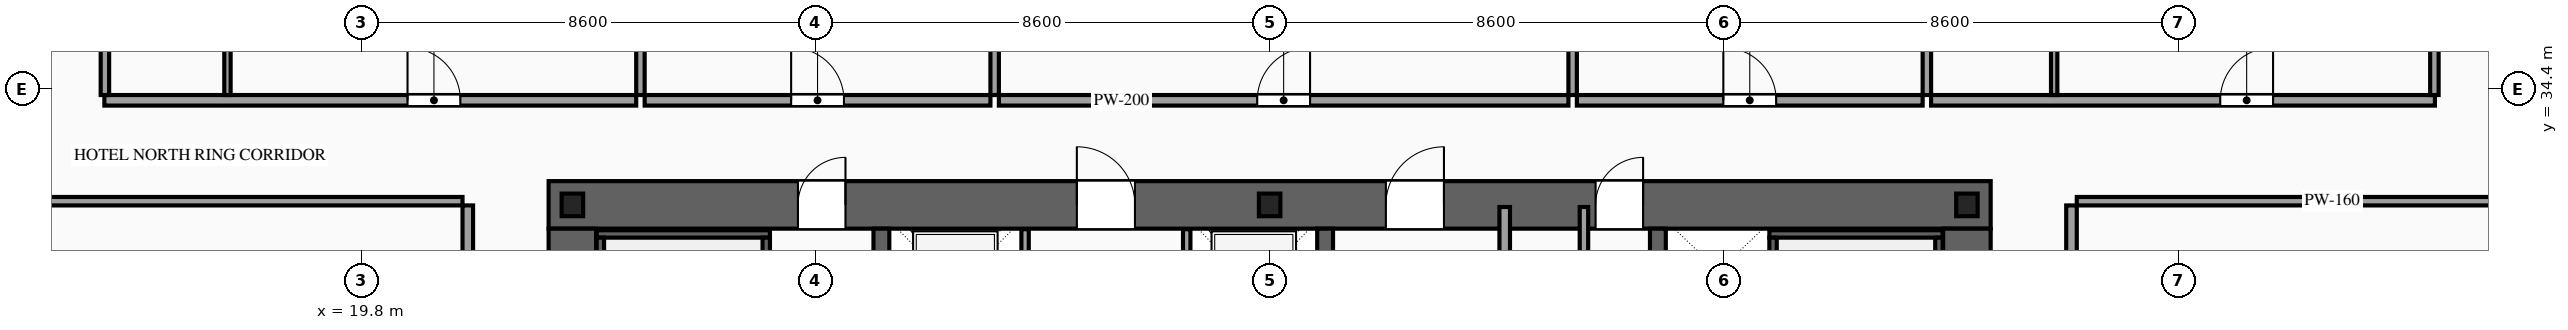
"""IFC4 building model, lengths in metres.
Left out: names, types, materials, properties, quantities, classifications, styles, units other than length and angle.
Written with IfcOpenShell. Run it as: python <this file> out.ifc"""

import sys

from ifc_helpers import new_model, si_unit, direction, frame, frame_2d, origin, origin_2d, place, context, subcontext, project, spatial, rectangle, i_section, extrude, source, transform, mapped, element, fill, save


model = new_model("IFC4")
c1 = context("Model", 3, precision=1e-05, world=origin(), true_north=direction((0.0, 1.0)))
c2 = subcontext(c1, "Body", "Model", "MODEL_VIEW")
j1 = project(units=[si_unit("LENGTHUNIT", "METRE"), si_unit("PLANEANGLEUNIT", "RADIAN")], contexts=[c1])
p1 = place(None, origin())
s1 = spatial("IfcSite", under=j1, at=p1, CompositionType="ELEMENT")
p2 = place(p1, origin())
s2 = spatial("IfcBuilding", under=s1, at=p2, CompositionType="ELEMENT")
p3 = place(p2, frame((0.0, 0.0, 64.0)))
s3 = spatial("IfcBuildingStorey", under=s2, at=p3, CompositionType="ELEMENT", Elevation=64.0)
p4 = place(p3, frame((23.35, 32.2, 0.0), z_axis=(0.0, 0.0, 1.0), x_axis=(1.0, 0.0, 0.0)))
e1 = element("IfcWall", 1, at=p4, inside=s3, PredefinedType="SHEAR", context=c2, shape_type="SweptSolid", body=[
    extrude(rectangle(XDim=27.3, YDim=0.9, at=frame_2d((13.65, 0.0))), origin(), (0.0, 0.0, 1.0), 3.6),
])
p5 = place(p4, frame((4.72, 0.0, 0.0)))
e2 = element("IfcOpeningElement", 2, at=p5, cuts=e1, PredefinedType="OPENING", context=c2, shape_type="SweptSolid", body=[
    extrude(rectangle(XDim=0.9, YDim=2.15, at=frame_2d((0.45, 1.075))), frame((0.0, 0.465, 0.0), z_axis=(0.0, -1.0, 0.0), x_axis=(1.0, 0.0, 0.0)), (0.0, 0.0, 1.0), 0.93),
])
p6 = place(p4, frame((10.0, 0.0, 0.0)))
e3 = element("IfcOpeningElement", 3, at=p6, cuts=e1, PredefinedType="OPENING", context=c2, shape_type="SweptSolid", body=[
    extrude(rectangle(XDim=1.1, YDim=2.2, at=frame_2d((0.55, 1.1))), frame((0.0, 0.465, 0.0), z_axis=(0.0, -1.0, 0.0), x_axis=(1.0, 0.0, 0.0)), (0.0, 0.0, 1.0), 0.93),
])
p7 = place(p4, frame((15.85, 0.0, 0.0)))
e4 = element("IfcOpeningElement", 4, at=p7, cuts=e1, PredefinedType="OPENING", context=c2, shape_type="SweptSolid", body=[
    extrude(rectangle(XDim=1.1, YDim=2.2, at=frame_2d((0.55, 1.1))), frame((0.0, 0.465, 0.0), z_axis=(0.0, -1.0, 0.0), x_axis=(1.0, 0.0, 0.0)), (0.0, 0.0, 1.0), 0.93),
])
p8 = place(p4, frame((19.82, 0.0, 0.0)))
e5 = element("IfcOpeningElement", 5, at=p8, cuts=e1, PredefinedType="OPENING", context=c2, shape_type="SweptSolid", body=[
    extrude(rectangle(XDim=0.9, YDim=2.15, at=frame_2d((0.45, 1.075))), frame((0.0, 0.465, 0.0), z_axis=(0.0, -1.0, 0.0), x_axis=(1.0, 0.0, 0.0)), (0.0, 0.0, 1.0), 0.93),
])
m1 = source(origin(), c2, "Body", "SweptSolid", [
    extrude(rectangle(XDim=11.9, YDim=0.9, at=frame_2d((5.95, 0.0))), origin(), (0.0, 0.0, 1.0), 3.6),
])
for number, where, z_axis, x_axis in (
    (6, (23.8, 19.85, 0.0), (0.0, 0.0, 1.0), (0.0, 1.0, 0.0)),
    (7, (50.2, 19.85, 0.0), (0.0, 0.0, 1.0), (0.0, 1.0, 0.0)),
):
    element("IfcWall", number, at=place(p3, frame(where, z_axis=z_axis, x_axis=x_axis)), inside=s3, PredefinedType="SHEAR", context=c2, shape_type="MappedRepresentation", body=[
        mapped(m1, transform((0.0, 0.0, 0.0), scale=1.0)),
    ])
m2 = source(origin(), c2, "Body", "SweptSolid", [
    extrude(rectangle(XDim=11.9, YDim=0.3, at=frame_2d((5.95, 0.0))), origin(), (0.0, 0.0, 1.0), 3.6),
])
for number, where, z_axis, x_axis in (
    (8, (29.65, 19.85, 0.0), (0.0, 0.0, 1.0), (0.0, 1.0, 0.0)),
    (9, (38.05, 19.85, 0.0), (0.0, 0.0, 1.0), (0.0, 1.0, 0.0)),
    (10, (44.35, 19.85, 0.0), (0.0, 0.0, 1.0), (0.0, 1.0, 0.0)),
):
    element("IfcWall", number, at=place(p3, frame(where, z_axis=z_axis, x_axis=x_axis)), inside=s3, PredefinedType="SOLIDWALL", context=c2, shape_type="MappedRepresentation", body=[
        mapped(m2, transform((0.0, 0.0, 0.0), scale=1.0)),
    ])
m3 = source(origin(), c2, "Body", "SweptSolid", [
    extrude(i_section(OverallWidth=0.407, OverallDepth=0.428, WebThickness=0.02, FlangeThickness=0.035, at=origin_2d()), origin(), (0.0, 0.0, 1.0), 3.6),
])
for number, where, z_axis, x_axis in (
    (11, (23.8, 32.2, 0.0), (0.0, 0.0, 1.0), (1.0, 0.0, 0.0)),
    (12, (37.0, 32.2, 0.0), (0.0, 0.0, 1.0), (1.0, 0.0, 0.0)),
    (13, (50.2, 32.2, 0.0), (0.0, 0.0, 1.0), (1.0, 0.0, 0.0)),
):
    element("IfcColumn", number, at=place(p3, frame(where, z_axis=z_axis, x_axis=x_axis)), inside=s3, PredefinedType="COLUMN", context=c2, shape_type="MappedRepresentation", body=[
        mapped(m3, transform((0.0, 0.0, 0.0), scale=1.0)),
    ])
p9 = place(p3, frame((32.37, 29.4, 0.0), z_axis=(0.0, 0.0, 1.0), x_axis=(0.0, 1.0, 0.0)))
e14 = element("IfcWall", 14, at=p9, inside=s3, PredefinedType="SOLIDWALL", context=c2, shape_type="SweptSolid", body=[
    extrude(rectangle(XDim=2.34, YDim=0.14, at=frame_2d((1.17, 0.0))), origin(), (0.0, 0.0, 1.0), 3.38),
])
p10 = place(p9, frame((0.62, 0.0, 0.0)))
e15 = element("IfcOpeningElement", 15, at=p10, cuts=e14, PredefinedType="OPENING", context=c2, shape_type="SweptSolid", body=[
    extrude(rectangle(XDim=1.1, YDim=2.2, at=frame_2d((0.55, 1.1))), frame((0.0, 0.085, 0.0), z_axis=(0.0, -1.0, 0.0), x_axis=(1.0, 0.0, 0.0)), (0.0, 0.0, 1.0), 0.17),
])
p11 = place(p3, frame((35.43, 29.4, 0.0), z_axis=(0.0, 0.0, 1.0), x_axis=(0.0, 1.0, 0.0)))
e16 = element("IfcWall", 16, at=p11, inside=s3, PredefinedType="SOLIDWALL", context=c2, shape_type="SweptSolid", body=[
    extrude(rectangle(XDim=2.34, YDim=0.14, at=frame_2d((1.17, 0.0))), origin(), (0.0, 0.0, 1.0), 3.38),
])
p12 = place(p11, frame((0.62, 0.0, 0.0)))
e17 = element("IfcOpeningElement", 17, at=p12, cuts=e16, PredefinedType="OPENING", context=c2, shape_type="SweptSolid", body=[
    extrude(rectangle(XDim=1.1, YDim=2.2, at=frame_2d((0.55, 1.1))), frame((0.0, 0.085, 0.0), z_axis=(0.0, -1.0, 0.0), x_axis=(1.0, 0.0, 0.0)), (0.0, 0.0, 1.0), 0.17),
])
m4 = source(origin(), c2, "Body", "SweptSolid", [
    extrude(rectangle(XDim=3.28, YDim=0.14, at=frame_2d((1.64, 0.0))), origin(), (0.0, 0.0, 1.0), 3.38),
])
p13 = place(p3, frame((24.26, 31.65, 0.0), z_axis=(0.0, 0.0, 1.0), x_axis=(1.0, 0.0, 0.0)))
e18 = element("IfcWall", 18, at=p13, inside=s3, PredefinedType="SOLIDWALL", context=c2, shape_type="MappedRepresentation", body=[
    mapped(m4, transform((0.0, 0.0, 0.0), scale=1.0)),
])
m5 = source(origin(), c2, "Body", "SweptSolid", [
    extrude(rectangle(XDim=8.94, YDim=0.14, at=frame_2d((4.47, 0.0))), origin(), (0.0, 0.0, 1.0), 3.38),
])
for number, where, z_axis, x_axis in (
    (19, (24.33, 22.64, 0.0), (0.0, 0.0, 1.0), (0.0, 1.0, 0.0)),
    (20, (27.47, 22.64, 0.0), (0.0, 0.0, 1.0), (0.0, 1.0, 0.0)),
):
    element("IfcWall", number, at=place(p3, frame(where, z_axis=z_axis, x_axis=x_axis)), inside=s3, PredefinedType="SOLIDWALL", context=c2, shape_type="MappedRepresentation", body=[
        mapped(m5, transform((0.0, 0.0, 0.0), scale=1.0)),
    ])
p14 = place(p3, frame((46.46, 31.65, 0.0), z_axis=(0.0, 0.0, 1.0), x_axis=(1.0, 0.0, 0.0)))
e21 = element("IfcWall", 21, at=p14, inside=s3, PredefinedType="SOLIDWALL", context=c2, shape_type="MappedRepresentation", body=[
    mapped(m4, transform((0.0, 0.0, 0.0), scale=1.0)),
])
for number, where, z_axis, x_axis in (
    (22, (46.53, 22.64, 0.0), (0.0, 0.0, 1.0), (0.0, 1.0, 0.0)),
    (23, (49.67, 22.64, 0.0), (0.0, 0.0, 1.0), (0.0, 1.0, 0.0)),
):
    element("IfcWall", number, at=place(p3, frame(where, z_axis=z_axis, x_axis=x_axis)), inside=s3, PredefinedType="SOLIDWALL", context=c2, shape_type="MappedRepresentation", body=[
        mapped(m5, transform((0.0, 0.0, 0.0), scale=1.0)),
    ])
m6 = source(origin(), c2, "Body", "SweptSolid", [
    extrude(rectangle(XDim=12.72, YDim=0.2, at=frame_2d((6.36, 0.0))), origin(), (0.0, 0.0, 1.0), 3.38),
])
p15 = place(p3, frame((41.45, 19.44, 0.0), z_axis=(0.0, 0.0, 1.0), x_axis=(0.0, 1.0, 0.0)))
e24 = element("IfcWall", 24, at=p15, inside=s3, PredefinedType="PARTITIONING", context=c2, shape_type="MappedRepresentation", body=[
    mapped(m6, transform((0.0, 0.0, 0.0), scale=1.0)),
])
m7 = source(origin(), c2, "Body", "SweptSolid", [
    extrude(rectangle(XDim=10.72, YDim=0.16, at=frame_2d((5.36, 0.0))), origin(), (0.0, 0.0, 1.0), 3.38),
])
p16 = place(p3, frame((42.95, 21.44, 0.0), z_axis=(0.0, 0.0, 1.0), x_axis=(0.0, 1.0, 0.0)))
e25 = element("IfcWall", 25, at=p16, inside=s3, PredefinedType="PARTITIONING", context=c2, shape_type="MappedRepresentation", body=[
    mapped(m7, transform((0.0, 0.0, 0.0), scale=1.0)),
])
p17 = place(p3, frame((14.94, 34.18, 0.0), z_axis=(0.0, 0.0, 1.0), x_axis=(1.0, 0.0, 0.0)))
e26 = element("IfcWall", 26, at=p17, inside=s3, PredefinedType="PARTITIONING", context=c2, shape_type="SweptSolid", body=[
    extrude(rectangle(XDim=10.068, YDim=0.2, at=frame_2d((5.034, 0.0))), origin(), (0.0, 0.0, 1.0), 3.38),
])
p18 = place(p17, frame((5.739, 0.0, 0.0)))
e27 = element("IfcOpeningElement", 27, at=p18, cuts=e26, PredefinedType="OPENING", context=c2, shape_type="SweptSolid", body=[
    extrude(rectangle(XDim=1.0, YDim=2.2, at=frame_2d((0.5, 1.1))), frame((0.0, 0.115, 0.0), z_axis=(0.0, -1.0, 0.0), x_axis=(1.0, 0.0, 0.0)), (0.0, 0.0, 1.0), 0.23),
])
m8 = source(origin(), c2, "Body", "SweptSolid", [
    extrude(rectangle(XDim=16.47, YDim=0.16, at=frame_2d((8.235, 0.0))), origin(), (0.0, 0.0, 1.0), 3.38),
])
p19 = place(p3, frame((25.088, 34.28, 0.0), z_axis=(0.0, 0.0, 1.0), x_axis=(0.0, 1.0, 0.0)))
e28 = element("IfcWall", 28, at=p19, inside=s3, PredefinedType="PARTITIONING", context=c2, shape_type="MappedRepresentation", body=[
    mapped(m8, transform((0.0, 0.0, 0.0), scale=1.0)),
])
m9 = source(origin(), c2, "Body", "SweptSolid", [
    extrude(rectangle(XDim=2.42, YDim=0.12, at=frame_2d((1.21, 0.0))), origin(), (0.0, 0.0, 1.0), 3.38),
])
p20 = place(p3, frame((17.27, 34.28, 0.0), z_axis=(0.0, 0.0, 1.0), x_axis=(0.0, 1.0, 0.0)))
e29 = element("IfcWall", 29, at=p20, inside=s3, PredefinedType="PARTITIONING", context=c2, shape_type="MappedRepresentation", body=[
    mapped(m9, transform((0.0, 0.0, 0.0), scale=1.0)),
])
p21 = place(p3, frame((25.168, 34.18, 0.0), z_axis=(0.0, 0.0, 1.0), x_axis=(1.0, 0.0, 0.0)))
e30 = element("IfcWall", 30, at=p21, inside=s3, PredefinedType="PARTITIONING", context=c2, shape_type="SweptSolid", body=[
    extrude(rectangle(XDim=6.546, YDim=0.2, at=frame_2d((3.273, 0.0))), origin(), (0.0, 0.0, 1.0), 3.38),
])
p22 = place(p21, frame((2.773, 0.0, 0.0)))
e31 = element("IfcOpeningElement", 31, at=p22, cuts=e30, PredefinedType="OPENING", context=c2, shape_type="SweptSolid", body=[
    extrude(rectangle(XDim=1.0, YDim=2.2, at=frame_2d((0.5, 1.1))), frame((0.0, 0.115, 0.0), z_axis=(0.0, -1.0, 0.0), x_axis=(1.0, 0.0, 0.0)), (0.0, 0.0, 1.0), 0.23),
])
p23 = place(p3, frame((31.794, 34.28, 0.0), z_axis=(0.0, 0.0, 1.0), x_axis=(0.0, 1.0, 0.0)))
e32 = element("IfcWall", 32, at=p23, inside=s3, PredefinedType="PARTITIONING", context=c2, shape_type="MappedRepresentation", body=[
    mapped(m8, transform((0.0, 0.0, 0.0), scale=1.0)),
])
p24 = place(p3, frame((31.874, 34.18, 0.0), z_axis=(0.0, 0.0, 1.0), x_axis=(1.0, 0.0, 0.0)))
e33 = element("IfcWall", 33, at=p24, inside=s3, PredefinedType="PARTITIONING", context=c2, shape_type="SweptSolid", body=[
    extrude(rectangle(XDim=10.782, YDim=0.2, at=frame_2d((5.391, 0.0))), origin(), (0.0, 0.0, 1.0), 3.38),
])
p25 = place(p24, frame((4.891, 0.0, 0.0)))
e34 = element("IfcOpeningElement", 34, at=p25, cuts=e33, PredefinedType="OPENING", context=c2, shape_type="SweptSolid", body=[
    extrude(rectangle(XDim=1.0, YDim=2.2, at=frame_2d((0.5, 1.1))), frame((0.0, 0.115, 0.0), z_axis=(0.0, -1.0, 0.0), x_axis=(1.0, 0.0, 0.0)), (0.0, 0.0, 1.0), 0.23),
])
p26 = place(p3, frame((42.736, 34.28, 0.0), z_axis=(0.0, 0.0, 1.0), x_axis=(0.0, 1.0, 0.0)))
e35 = element("IfcWall", 35, at=p26, inside=s3, PredefinedType="PARTITIONING", context=c2, shape_type="MappedRepresentation", body=[
    mapped(m8, transform((0.0, 0.0, 0.0), scale=1.0)),
])
p27 = place(p3, frame((42.816, 34.18, 0.0), z_axis=(0.0, 0.0, 1.0), x_axis=(1.0, 0.0, 0.0)))
e36 = element("IfcWall", 36, at=p27, inside=s3, PredefinedType="PARTITIONING", context=c2, shape_type="SweptSolid", body=[
    extrude(rectangle(XDim=6.546, YDim=0.2, at=frame_2d((3.273, 0.0))), origin(), (0.0, 0.0, 1.0), 3.38),
])
p28 = place(p27, frame((2.773, 0.0, 0.0)))
e37 = element("IfcOpeningElement", 37, at=p28, cuts=e36, PredefinedType="OPENING", context=c2, shape_type="SweptSolid", body=[
    extrude(rectangle(XDim=1.0, YDim=2.2, at=frame_2d((0.5, 1.1))), frame((0.0, 0.115, 0.0), z_axis=(0.0, -1.0, 0.0), x_axis=(1.0, 0.0, 0.0)), (0.0, 0.0, 1.0), 0.23),
])
p29 = place(p3, frame((49.442, 34.28, 0.0), z_axis=(0.0, 0.0, 1.0), x_axis=(0.0, 1.0, 0.0)))
e38 = element("IfcWall", 38, at=p29, inside=s3, PredefinedType="PARTITIONING", context=c2, shape_type="MappedRepresentation", body=[
    mapped(m8, transform((0.0, 0.0, 0.0), scale=1.0)),
])
p30 = place(p3, frame((49.522, 34.18, 0.0), z_axis=(0.0, 0.0, 1.0), x_axis=(1.0, 0.0, 0.0)))
e39 = element("IfcWall", 39, at=p30, inside=s3, PredefinedType="PARTITIONING", context=c2, shape_type="SweptSolid", body=[
    extrude(rectangle(XDim=9.538, YDim=0.2, at=frame_2d((4.769, 0.0))), origin(), (0.0, 0.0, 1.0), 3.38),
])
p31 = place(p30, frame((5.474, 0.0, 0.0)))
e40 = element("IfcOpeningElement", 40, at=p31, cuts=e39, PredefinedType="OPENING", context=c2, shape_type="SweptSolid", body=[
    extrude(rectangle(XDim=1.0, YDim=2.2, at=frame_2d((0.5, 1.1))), frame((0.0, 0.115, 0.0), z_axis=(0.0, -1.0, 0.0), x_axis=(1.0, 0.0, 0.0)), (0.0, 0.0, 1.0), 0.23),
])
m10 = source(origin(), c2, "Body", "SweptSolid", [
    extrude(rectangle(XDim=16.32, YDim=0.16, at=frame_2d((8.16, 0.0))), origin(), (0.0, 0.0, 1.0), 3.38),
])
for number, where, z_axis, x_axis in (
    (41, (14.95, 34.28, 0.0), (0.0, 0.0, 1.0), (0.0, 1.0, 0.0)),
    (42, (59.05, 34.28, 0.0), (0.0, 0.0, 1.0), (0.0, 1.0, 0.0)),
):
    element("IfcWall", number, at=place(p3, frame(where, z_axis=z_axis, x_axis=x_axis)), inside=s3, PredefinedType="PARTITIONING", context=c2, shape_type="MappedRepresentation", body=[
        mapped(m10, transform((0.0, 0.0, 0.0), scale=1.0)),
    ])
p32 = place(p3, frame((51.852, 34.28, 0.0), z_axis=(0.0, 0.0, 1.0), x_axis=(0.0, 1.0, 0.0)))
e43 = element("IfcWall", 43, at=p32, inside=s3, PredefinedType="PARTITIONING", context=c2, shape_type="MappedRepresentation", body=[
    mapped(m9, transform((0.0, 0.0, 0.0), scale=1.0)),
])
p33 = place(p3, frame((21.82, 25.88, 0.0), z_axis=(0.0, 0.0, 1.0), x_axis=(0.0, 1.0, 0.0)))
e44 = element("IfcWall", 44, at=p33, inside=s3, PredefinedType="PARTITIONING", context=c2, shape_type="SweptSolid", body=[
    extrude(rectangle(XDim=6.31, YDim=0.2, at=frame_2d((3.155, 0.0))), origin(), (0.0, 0.0, 1.0), 3.38),
])
p34 = place(p33, frame((3.835, 0.0, 0.0)))
e45 = element("IfcOpeningElement", 45, at=p34, cuts=e44, PredefinedType="OPENING", context=c2, shape_type="SweptSolid", body=[
    extrude(rectangle(XDim=1.0, YDim=2.2, at=frame_2d((0.5, 1.1))), frame((0.0, 0.115, 0.0), z_axis=(0.0, -1.0, 0.0), x_axis=(1.0, 0.0, 0.0)), (0.0, 0.0, 1.0), 0.23),
])
m11 = source(origin(), c2, "Body", "SweptSolid", [
    extrude(rectangle(XDim=9.67, YDim=0.16, at=frame_2d((4.835, 0.0))), origin(), (0.0, 0.0, 1.0), 2.875),
])
p35 = place(p3, frame((12.05, 32.27, 0.0), z_axis=(0.0, 0.0, 1.0), x_axis=(1.0, 0.0, 0.0)))
e46 = element("IfcWall", 46, at=p35, inside=s3, PredefinedType="PARTITIONING", context=c2, shape_type="MappedRepresentation", body=[
    mapped(m11, transform((0.0, 0.0, 0.0), scale=1.0)),
])
p36 = place(p3, frame((52.18, 25.88, 0.0), z_axis=(0.0, 0.0, 1.0), x_axis=(0.0, 1.0, 0.0)))
e47 = element("IfcWall", 47, at=p36, inside=s3, PredefinedType="PARTITIONING", context=c2, shape_type="SweptSolid", body=[
    extrude(rectangle(XDim=6.31, YDim=0.2, at=frame_2d((3.155, 0.0))), origin(), (0.0, 0.0, 1.0), 3.38),
])
p37 = place(p36, frame((3.835, 0.0, 0.0)))
e48 = element("IfcOpeningElement", 48, at=p37, cuts=e47, PredefinedType="OPENING", context=c2, shape_type="SweptSolid", body=[
    extrude(rectangle(XDim=1.0, YDim=2.2, at=frame_2d((0.5, 1.1))), frame((0.0, 0.115, 0.0), z_axis=(0.0, -1.0, 0.0), x_axis=(1.0, 0.0, 0.0)), (0.0, 0.0, 1.0), 0.23),
])
p38 = place(p3, frame((52.28, 32.27, 0.0), z_axis=(0.0, 0.0, 1.0), x_axis=(1.0, 0.0, 0.0)))
e49 = element("IfcWall", 49, at=p38, inside=s3, PredefinedType="PARTITIONING", context=c2, shape_type="MappedRepresentation", body=[
    mapped(m11, transform((0.0, 0.0, 0.0), scale=1.0)),
])
m12 = source(origin(), c2, "Body", "SweptSolid", [
    extrude(rectangle(XDim=0.9, YDim=2.15, at=frame_2d((0.45, 1.075))), frame((0.0, 0.025, 0.0), z_axis=(0.0, -1.0, 0.0), x_axis=(1.0, 0.0, 0.0)), (0.0, 0.0, 1.0), 0.05),
])
p39 = place(p5, origin())
e50 = element("IfcDoor", 50, at=p39, inside=s3, OperationType="SINGLE_SWING_RIGHT", PredefinedType="DOOR", context=c2, shape_type="MappedRepresentation", body=[
    mapped(m12, transform((0.0, 0.0, 0.0), scale=1.0)),
])
fill(e2, e50)
m13 = source(origin(), c2, "Body", "SweptSolid", [
    extrude(rectangle(XDim=1.1, YDim=2.2, at=frame_2d((0.55, 1.1))), frame((0.0, 0.025, 0.0), z_axis=(0.0, -1.0, 0.0), x_axis=(1.0, 0.0, 0.0)), (0.0, 0.0, 1.0), 0.05),
])
p40 = place(p6, origin())
e51 = element("IfcDoor", 51, at=p40, inside=s3, OperationType="SINGLE_SWING_LEFT", PredefinedType="DOOR", context=c2, shape_type="MappedRepresentation", body=[
    mapped(m13, transform((0.0, 0.0, 0.0), scale=1.0)),
])
fill(e3, e51)
p41 = place(p7, origin())
e52 = element("IfcDoor", 52, at=p41, inside=s3, OperationType="SINGLE_SWING_RIGHT", PredefinedType="DOOR", context=c2, shape_type="MappedRepresentation", body=[
    mapped(m13, transform((0.0, 0.0, 0.0), scale=1.0)),
])
fill(e4, e52)
p42 = place(p8, origin())
e53 = element("IfcDoor", 53, at=p42, inside=s3, OperationType="SINGLE_SWING_RIGHT", PredefinedType="DOOR", context=c2, shape_type="MappedRepresentation", body=[
    mapped(m12, transform((0.0, 0.0, 0.0), scale=1.0)),
])
fill(e5, e53)
m14 = source(origin(), c2, "Body", "SweptSolid", [
    extrude(rectangle(XDim=1.0, YDim=2.2, at=frame_2d((0.5, 1.1))), frame((0.0, 0.025, 0.0), z_axis=(0.0, -1.0, 0.0), x_axis=(1.0, 0.0, 0.0)), (0.0, 0.0, 1.0), 0.05),
])
p43 = place(p18, origin())
e54 = element("IfcDoor", 54, at=p43, inside=s3, OperationType="SINGLE_SWING_LEFT", PredefinedType="DOOR", context=c2, shape_type="MappedRepresentation", body=[
    mapped(m14, transform((0.0, 0.0, 0.0), scale=1.0)),
])
fill(e27, e54)
p44 = place(p22, origin())
e55 = element("IfcDoor", 55, at=p44, inside=s3, OperationType="SINGLE_SWING_LEFT", PredefinedType="DOOR", context=c2, shape_type="MappedRepresentation", body=[
    mapped(m14, transform((0.0, 0.0, 0.0), scale=1.0)),
])
fill(e31, e55)
p45 = place(p25, origin())
e56 = element("IfcDoor", 56, at=p45, inside=s3, OperationType="SINGLE_SWING_RIGHT", PredefinedType="DOOR", context=c2, shape_type="MappedRepresentation", body=[
    mapped(m14, transform((0.0, 0.0, 0.0), scale=1.0)),
])
fill(e34, e56)
p46 = place(p28, origin())
e57 = element("IfcDoor", 57, at=p46, inside=s3, OperationType="SINGLE_SWING_LEFT", PredefinedType="DOOR", context=c2, shape_type="MappedRepresentation", body=[
    mapped(m14, transform((0.0, 0.0, 0.0), scale=1.0)),
])
fill(e37, e57)
p47 = place(p31, origin())
e58 = element("IfcDoor", 58, at=p47, inside=s3, OperationType="SINGLE_SWING_RIGHT", PredefinedType="DOOR", context=c2, shape_type="MappedRepresentation", body=[
    mapped(m14, transform((0.0, 0.0, 0.0), scale=1.0)),
])
fill(e40, e58)
save(model, sys.argv[1])
